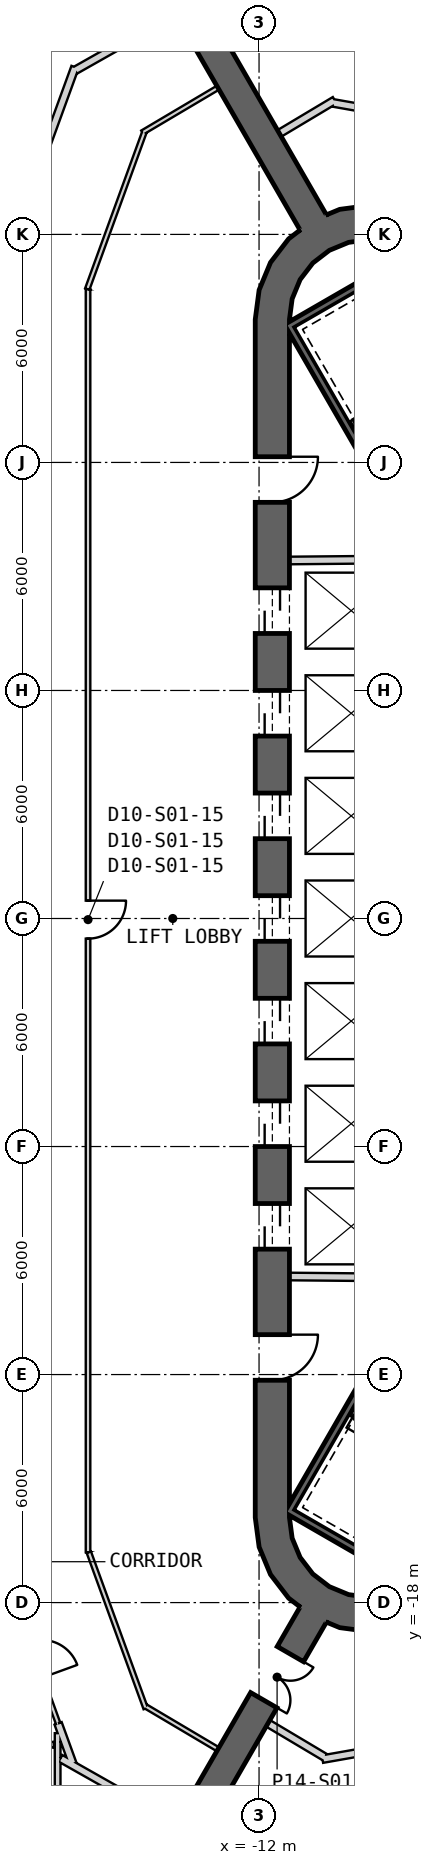
"""IFC4 building model, lengths in metres.
Left out: names, types, materials, properties, quantities, classifications, styles, units other than length and angle.
Written with IfcOpenShell. Run it as: python <this file> out.ifc"""

import sys

from ifc_helpers import new_model, si_unit, direction, frame, frame_2d, origin, place, context, subcontext, project, spatial, polyline, rectangle, outline, extrude, element, fill, save


model = new_model("IFC4")
c1 = context("Model", 3, precision=1e-05, world=origin(), true_north=direction((0.0, 1.0)))
c2 = subcontext(c1, "Body", "Model", "MODEL_VIEW")
j1 = project(units=[si_unit("LENGTHUNIT", "METRE"), si_unit("PLANEANGLEUNIT", "RADIAN")], contexts=[c1])
p1 = place(None, origin())
s1 = spatial("IfcSite", under=j1, at=p1, CompositionType="ELEMENT")
p2 = place(p1, origin())
s2 = spatial("IfcBuilding", under=s1, at=p2, CompositionType="ELEMENT")
p3 = place(p2, frame((0.0, 0.0, 57.8)))
s3 = spatial("IfcBuildingStorey", under=s2, at=p3, CompositionType="ELEMENT", Elevation=57.8)
p4 = place(p3, frame((-11.65, 15.762, 0.0), z_axis=(0.0, 0.0, 1.0), x_axis=(0.0, -1.0, 0.0)))
e1 = element("IfcWall", 1, at=p4, inside=s3, PredefinedType="SHEAR", context=c2, shape_type="SweptSolid", body=[
    extrude(rectangle(XDim=31.523, YDim=0.9, at=frame_2d((15.762, 0.0))), origin(), (0.0, 0.0, 1.0), 4.1),
])
p5 = place(p4, frame((7.062, 0.0, 0.0)))
e2 = element("IfcOpeningElement", 2, at=p5, cuts=e1, PredefinedType="OPENING", context=c2, shape_type="SweptSolid", body=[
    extrude(rectangle(XDim=1.2, YDim=2.4, at=frame_2d((0.6, 1.2))), frame((0.0, 0.46, 0.0), z_axis=(0.0, -1.0, 0.0), x_axis=(1.0, 0.0, 0.0)), (0.0, 0.0, 1.0), 0.92),
])
p6 = place(p4, frame((9.762, 0.0, 0.0)))
e3 = element("IfcOpeningElement", 3, at=p6, cuts=e1, PredefinedType="OPENING", context=c2, shape_type="SweptSolid", body=[
    extrude(rectangle(XDim=1.2, YDim=2.4, at=frame_2d((0.6, 1.2))), frame((0.0, 0.46, 0.0), z_axis=(0.0, -1.0, 0.0), x_axis=(1.0, 0.0, 0.0)), (0.0, 0.0, 1.0), 0.92),
])
p7 = place(p4, frame((12.462, 0.0, 0.0)))
e4 = element("IfcOpeningElement", 4, at=p7, cuts=e1, PredefinedType="OPENING", context=c2, shape_type="SweptSolid", body=[
    extrude(rectangle(XDim=1.2, YDim=2.4, at=frame_2d((0.6, 1.2))), frame((0.0, 0.46, 0.0), z_axis=(0.0, -1.0, 0.0), x_axis=(1.0, 0.0, 0.0)), (0.0, 0.0, 1.0), 0.92),
])
p8 = place(p4, frame((15.162, 0.0, 0.0)))
e5 = element("IfcOpeningElement", 5, at=p8, cuts=e1, PredefinedType="OPENING", context=c2, shape_type="SweptSolid", body=[
    extrude(rectangle(XDim=1.2, YDim=2.4, at=frame_2d((0.6, 1.2))), frame((0.0, 0.46, 0.0), z_axis=(0.0, -1.0, 0.0), x_axis=(1.0, 0.0, 0.0)), (0.0, 0.0, 1.0), 0.92),
])
p9 = place(p4, frame((17.862, 0.0, 0.0)))
e6 = element("IfcOpeningElement", 6, at=p9, cuts=e1, PredefinedType="OPENING", context=c2, shape_type="SweptSolid", body=[
    extrude(rectangle(XDim=1.2, YDim=2.4, at=frame_2d((0.6, 1.2))), frame((0.0, 0.46, 0.0), z_axis=(0.0, -1.0, 0.0), x_axis=(1.0, 0.0, 0.0)), (0.0, 0.0, 1.0), 0.92),
])
p10 = place(p4, frame((20.562, 0.0, 0.0)))
e7 = element("IfcOpeningElement", 7, at=p10, cuts=e1, PredefinedType="OPENING", context=c2, shape_type="SweptSolid", body=[
    extrude(rectangle(XDim=1.2, YDim=2.4, at=frame_2d((0.6, 1.2))), frame((0.0, 0.46, 0.0), z_axis=(0.0, -1.0, 0.0), x_axis=(1.0, 0.0, 0.0)), (0.0, 0.0, 1.0), 0.92),
])
p11 = place(p4, frame((23.262, 0.0, 0.0)))
e8 = element("IfcOpeningElement", 8, at=p11, cuts=e1, PredefinedType="OPENING", context=c2, shape_type="SweptSolid", body=[
    extrude(rectangle(XDim=1.2, YDim=2.4, at=frame_2d((0.6, 1.2))), frame((0.0, 0.46, 0.0), z_axis=(0.0, -1.0, 0.0), x_axis=(1.0, 0.0, 0.0)), (0.0, 0.0, 1.0), 0.92),
])
p12 = place(p4, frame((3.612, 0.0, 0.0)))
e9 = element("IfcOpeningElement", 9, at=p12, cuts=e1, PredefinedType="OPENING", context=c2, shape_type="SweptSolid", body=[
    extrude(rectangle(XDim=1.2, YDim=2.4, at=frame_2d((0.6, 1.2))), frame((0.0, 0.46, 0.0), z_axis=(0.0, -1.0, 0.0), x_axis=(1.0, 0.0, 0.0)), (0.0, 0.0, 1.0), 0.92),
])
p13 = place(p4, frame((26.712, 0.0, 0.0)))
e10 = element("IfcOpeningElement", 10, at=p13, cuts=e1, PredefinedType="OPENING", context=c2, shape_type="SweptSolid", body=[
    extrude(rectangle(XDim=1.2, YDim=2.4, at=frame_2d((0.6, 1.2))), frame((0.0, 0.46, 0.0), z_axis=(0.0, -1.0, 0.0), x_axis=(1.0, 0.0, 0.0)), (0.0, 0.0, 1.0), 0.92),
])
p14 = place(p3, origin())
e11 = element("IfcWall", 11, at=p14, inside=s3, PredefinedType="SHEAR", context=c2, shape_type="SweptSolid", body=[
    extrude(outline(polyline([(-7.6, 18.36), (-8.323, 18.659), (-9.1, 18.762), (-9.876, 18.659), (-10.6, 18.36), (-11.221, 17.883), (-11.698, 17.262), (-11.998, 16.538), (-12.1, 15.762), (-11.2, 15.762), (-11.128, 16.305), (-10.919, 16.812), (-10.585, 17.247), (-10.15, 17.58), (-9.644, 17.79), (-9.1, 17.862), (-8.556, 17.79), (-8.05, 17.58), (-7.6, 18.36)])), origin(), (0.0, 0.0, 1.0), 4.1),
])
p15 = place(p3, origin())
e12 = element("IfcWall", 12, at=p15, inside=s3, PredefinedType="SHEAR", context=c2, shape_type="SweptSolid", body=[
    extrude(outline(polyline([(-12.1, -15.762), (-11.998, -16.538), (-11.698, -17.262), (-11.221, -17.883), (-10.6, -18.36), (-9.876, -18.659), (-9.1, -18.762), (-8.323, -18.659), (-7.6, -18.36), (-8.05, -17.58), (-8.556, -17.79), (-9.1, -17.862), (-9.644, -17.79), (-10.15, -17.58), (-10.585, -17.247), (-10.919, -16.812), (-11.128, -16.305), (-11.2, -15.762), (-12.1, -15.762)])), origin(), (0.0, 0.0, 1.0), 4.1),
])
p16 = place(p3, frame((-10.575, 18.316, 0.0), z_axis=(0.0, 0.0, 1.0), x_axis=(-0.500001010139, 0.866024820579, 0.0)))
e13 = element("IfcWall", 13, at=p16, inside=s3, PredefinedType="SHEAR", context=c2, shape_type="SweptSolid", body=[
    extrude(rectangle(XDim=13.884, YDim=0.8, at=frame_2d((6.942, 0.0))), origin(), (0.0, 0.0, 1.0), 4.1),
])
p17 = place(p16, frame((7.05, 0.0, 0.0)))
e14 = element("IfcOpeningElement", 14, at=p17, cuts=e13, PredefinedType="OPENING", context=c2, shape_type="SweptSolid", body=[
    extrude(rectangle(XDim=1.4, YDim=2.4, at=frame_2d((0.7, 1.2))), frame((0.0, 0.41, 0.0), z_axis=(0.0, -1.0, 0.0), x_axis=(1.0, 0.0, 0.0)), (0.0, 0.0, 1.0), 0.82),
])
p18 = place(p3, frame((-10.575, -18.316, 0.0), z_axis=(0.0, 0.0, 1.0), x_axis=(-0.500001010139, -0.866024820579, 0.0)))
e15 = element("IfcWall", 15, at=p18, inside=s3, PredefinedType="SHEAR", context=c2, shape_type="SweptSolid", body=[
    extrude(rectangle(XDim=13.884, YDim=0.8, at=frame_2d((6.942, 0.0))), origin(), (0.0, 0.0, 1.0), 4.1),
])
p19 = place(p18, frame((1.2, 0.0, 0.0)))
e16 = element("IfcOpeningElement", 16, at=p19, cuts=e15, PredefinedType="OPENING", context=c2, shape_type="SweptSolid", body=[
    extrude(rectangle(XDim=1.4, YDim=2.4, at=frame_2d((0.7, 1.2))), frame((0.0, 0.41, 0.0), z_axis=(0.0, -1.0, 0.0), x_axis=(1.0, 0.0, 0.0)), (0.0, 0.0, 1.0), 0.82),
])
p20 = place(p3, frame((-11.2, 9.42, 0.0), z_axis=(0.0, 0.0, 1.0), x_axis=(0.999957167047, 0.009255488683, 0.0)))
e17 = element("IfcWall", 17, at=p20, inside=s3, PredefinedType="PLUMBINGWALL", context=c2, shape_type="SweptSolid", body=[
    extrude(rectangle(XDim=3.35, YDim=0.2, at=frame_2d((1.675, 0.0))), origin(), (0.0, 0.0, 1.0), 3.8),
])
p21 = place(p3, frame((-8.05, -9.449, 0.0), z_axis=(0.0, 0.0, 1.0), x_axis=(-0.999957467379, 0.009222983926, 0.0)))
e18 = element("IfcWall", 18, at=p21, inside=s3, PredefinedType="PLUMBINGWALL", context=c2, shape_type="SweptSolid", body=[
    extrude(rectangle(XDim=3.15, YDim=0.2, at=frame_2d((1.575, 0.0))), origin(), (0.0, 0.0, 1.0), 3.8),
])
p22 = place(p3, frame((-11.245, 15.678, -0.3), z_axis=(0.0, 0.0, 1.0), x_axis=(0.499977274689, -0.866038523851, 0.0)))
e19 = element("IfcWall", 19, at=p22, inside=s3, PredefinedType="SHEAR", context=c2, shape_type="SweptSolid", body=[
    extrude(rectangle(XDim=8.1, YDim=0.2, at=frame_2d((4.05, 0.0))), origin(), (0.0, 0.0, 1.0), 4.1),
])
for number, where, z_axis, x_axis in (
    (20, (-7.818, 17.541, -0.3), (0.0, 0.0, 1.0), (-0.866, -0.5, 0.0)),
    (21, (-11.282, -15.541, -0.3), (0.0, 0.0, 1.0), (0.866, -0.5, 0.0)),
):
    element("IfcWall", number, at=place(p3, frame(where, z_axis=z_axis, x_axis=x_axis)), inside=s3, PredefinedType="SHEAR", context=c2, shape_type="SweptSolid", body=[
        extrude(rectangle(XDim=3.8, YDim=0.2, at=frame_2d((1.9, 0.0))), origin(), (0.0, 0.0, 1.0), 4.1),
    ])
p23 = place(p3, frame((-7.196, -8.663, -0.3), z_axis=(0.0, 0.0, 1.0), x_axis=(-0.499997992926, -0.866026562566, 0.0)))
e22 = element("IfcWall", 22, at=p23, inside=s3, PredefinedType="SHEAR", context=c2, shape_type="SweptSolid", body=[
    extrude(rectangle(XDim=7.9, YDim=0.2, at=frame_2d((3.95, 0.0))), origin(), (0.0, 0.0, 1.0), 4.1),
])
p24 = place(p3, frame((-13.082, 21.859, 0.0), z_axis=(0.0, 0.0, 1.0), x_axis=(-0.860286384661, -0.509811079095, 0.0)))
e23 = element("IfcWall", 23, at=p24, inside=s3, PredefinedType="PARTITIONING", context=c2, shape_type="SweptSolid", body=[
    extrude(rectangle(XDim=2.311, YDim=0.12, at=frame_2d((1.155, 0.0))), origin(), (0.0, 0.0, 1.0), 3.8),
])
p25 = place(p3, frame((-15.017, 20.692, 0.0), z_axis=(0.0, 0.0, 1.0), x_axis=(-0.342028368186, -0.939689627141, 0.0)))
e24 = element("IfcWall", 24, at=p25, inside=s3, PredefinedType="PARTITIONING", context=c2, shape_type="SweptSolid", body=[
    extrude(rectangle(XDim=4.397, YDim=0.12, at=frame_2d((2.198, 0.0))), origin(), (0.0, 0.0, 1.0), 2.88),
])
p26 = place(p3, frame((-16.5, 16.557, 0.0), z_axis=(0.0, 0.0, 1.0), x_axis=(0.0, -1.0, 0.0)))
e25 = element("IfcWall", 25, at=p26, inside=s3, PredefinedType="PARTITIONING", context=c2, shape_type="SweptSolid", body=[
    extrude(rectangle(XDim=33.234, YDim=0.12, at=frame_2d((16.617, 0.0))), origin(), (0.0, 0.0, 1.0), 2.98),
])
p27 = place(p26, frame((16.087, 0.0, 0.0)))
e26 = element("IfcOpeningElement", 26, at=p27, cuts=e25, PredefinedType="OPENING", context=c2, shape_type="SweptSolid", body=[
    extrude(rectangle(XDim=1.0, YDim=2.1, at=frame_2d((0.5, 1.05))), frame((0.0, 0.07, 0.0), z_axis=(0.0, -1.0, 0.0), x_axis=(1.0, 0.0, 0.0)), (0.0, 0.0, 1.0), 0.14),
])
p28 = place(p3, frame((-16.479, -16.673, 0.0), z_axis=(0.0, 0.0, 1.0), x_axis=(0.342025144217, -0.939690800595, 0.0)))
e27 = element("IfcWall", 27, at=p28, inside=s3, PredefinedType="PARTITIONING", context=c2, shape_type="SweptSolid", body=[
    extrude(rectangle(XDim=4.378, YDim=0.12, at=frame_2d((2.189, 0.0))), origin(), (0.0, 0.0, 1.0), 2.88),
])
p29 = place(p3, frame((-14.983, -20.732, 0.0), z_axis=(0.0, 0.0, 1.0), x_axis=(0.860268204019, -0.509841756973, 0.0)))
e28 = element("IfcWall", 28, at=p29, inside=s3, PredefinedType="PARTITIONING", context=c2, shape_type="SweptSolid", body=[
    extrude(rectangle(XDim=2.21, YDim=0.12, at=frame_2d((1.105, 0.0))), origin(), (0.0, 0.0, 1.0), 3.8),
])
p30 = place(p3, frame((-17.225, -22.098, 0.0), z_axis=(0.0, 0.0, 1.0), x_axis=(0.870318902943, -0.492488585838, 0.0)))
e29 = element("IfcWall", 29, at=p30, inside=s3, PredefinedType="PARTITIONING", context=c2, shape_type="SweptSolid", body=[
    extrude(rectangle(XDim=3.469, YDim=0.2, at=frame_2d((1.734, 0.0))), origin(), (0.0, 0.0, 1.0), 2.88),
])
p31 = place(p3, frame((-17.288, -21.178, 0.0), z_axis=(0.0, 0.0, 1.0), x_axis=(0.342070628624, -0.939674244104, 0.0)))
e30 = element("IfcWall", 30, at=p31, inside=s3, PredefinedType="PARTITIONING", context=c2, shape_type="SweptSolid", body=[
    extrude(rectangle(XDim=1.137, YDim=0.2, at=frame_2d((0.568, 0.0))), origin(), (0.0, 0.0, 1.0), 2.88),
])
p32 = place(p3, frame((-16.842, 22.402, 0.0), z_axis=(0.0, 0.0, 1.0), x_axis=(-0.342049747763, -0.939681845124, 0.0)))
e31 = element("IfcWall", 31, at=p32, inside=s3, PredefinedType="PARTITIONING", context=c2, shape_type="SweptSolid", body=[
    extrude(rectangle(XDim=5.625, YDim=0.2, at=frame_2d((2.812, 0.0))), origin(), (0.0, 0.0, 1.0), 2.88),
])
p33 = place(p3, frame((-14.206, 23.806, 0.0), z_axis=(0.0, 0.0, 1.0), x_axis=(-0.87028621909, -0.492546339811, 0.0)))
e32 = element("IfcWall", 32, at=p33, inside=s3, PredefinedType="PARTITIONING", context=c2, shape_type="SweptSolid", body=[
    extrude(rectangle(XDim=3.026, YDim=0.2, at=frame_2d((1.513, 0.0))), origin(), (0.0, 0.0, 1.0), 3.8),
])
p34 = place(p3, frame((-18.5, -17.846, 0.0), z_axis=(0.0, 0.0, 1.0), x_axis=(0.342013954414, -0.939694873342, 0.0)))
e33 = element("IfcWall", 33, at=p34, inside=s3, PredefinedType="PARTITIONING", context=c2, shape_type="SweptSolid", body=[
    extrude(rectangle(XDim=3.546, YDim=0.12, at=frame_2d((1.773, 0.0))), origin(), (0.0, 0.0, 1.0), 3.8),
])
p35 = place(p34, frame((1.273, 0.0, 0.0)))
e34 = element("IfcOpeningElement", 34, at=p35, cuts=e33, PredefinedType="OPENING", context=c2, shape_type="SweptSolid", body=[
    extrude(rectangle(XDim=1.0, YDim=2.1, at=frame_2d((0.5, 1.05))), frame((0.0, 0.07, 0.0), z_axis=(0.0, -1.0, 0.0), x_axis=(1.0, 0.0, 0.0)), (0.0, 0.0, 1.0), 0.14),
])
p36 = place(p3, frame((-10.007, 21.529, 0.0), z_axis=(0.0, 0.0, 1.0), x_axis=(-0.858379714818, -0.513014878136, 0.0)))
e35 = element("IfcWall", 35, at=p36, inside=s3, PredefinedType="PARTITIONING", context=c2, shape_type="SweptSolid", body=[
    extrude(rectangle(XDim=1.698, YDim=0.2, at=frame_2d((0.849, 0.0))), origin(), (0.0, 0.0, 1.0), 3.8),
])
p37 = place(p3, frame((-6.667, 20.863, 0.0), z_axis=(0.0, 0.0, 1.0), x_axis=(-0.984817805596, 0.173591156977, 0.0)))
e36 = element("IfcWall", 36, at=p37, inside=s3, PredefinedType="PARTITIONING", context=c2, shape_type="SweptSolid", body=[
    extrude(rectangle(XDim=3.443, YDim=0.2, at=frame_2d((1.721, 0.0))), origin(), (0.0, 0.0, 1.0), 2.88),
])
p38 = place(p3, frame((-10.332, -22.118, 0.0), z_axis=(0.0, 0.0, 1.0), x_axis=(0.984805281118, 0.173662195893, 0.0)))
e37 = element("IfcWall", 37, at=p38, inside=s3, PredefinedType="PARTITIONING", context=c2, shape_type="SweptSolid", body=[
    extrude(rectangle(XDim=3.732, YDim=0.2, at=frame_2d((1.866, 0.0))), origin(), (0.0, 0.0, 1.0), 2.88),
])
p39 = place(p3, frame((-11.764, -21.177, 0.0), z_axis=(0.0, 0.0, 1.0), x_axis=(0.85911197479, -0.511787665709, 0.0)))
e38 = element("IfcWall", 38, at=p39, inside=s3, PredefinedType="PARTITIONING", context=c2, shape_type="SweptSolid", body=[
    extrude(rectangle(XDim=1.752, YDim=0.2, at=frame_2d((0.876, 0.0))), origin(), (0.0, 0.0, 1.0), 3.8),
])
p40 = place(p3, frame((-17.3, -27.155, 0.0), z_axis=(0.0, 0.0, 1.0), x_axis=(0.0, 1.0, 0.0)))
e39 = element("IfcWall", 39, at=p40, inside=s3, PredefinedType="PLUMBINGWALL", context=c2, shape_type="SweptSolid", body=[
    extrude(rectangle(XDim=5.719, YDim=0.15, at=frame_2d((2.859, 0.0))), origin(), (0.0, 0.0, 1.0), 2.88),
])
p41 = place(p3, frame((-17.4, -21.741, 0.0), z_axis=(0.0, 0.0, 1.0), x_axis=(-1.0, 0.0, 0.0)))
e40 = element("IfcWall", 40, at=p41, inside=s3, PredefinedType="PLUMBINGWALL", context=c2, shape_type="SweptSolid", body=[
    extrude(rectangle(XDim=6.58, YDim=0.15, at=frame_2d((3.29, 0.0))), origin(), (0.0, 0.0, 1.0), 2.98),
])
p42 = place(p27, origin())
e41 = element("IfcDoor", 41, at=p42, inside=s3, OperationType="SINGLE_SWING_LEFT", PredefinedType="NOTDEFINED", context=c2, shape_type="SweptSolid", body=[
    extrude(rectangle(XDim=1.0, YDim=2.1, at=frame_2d((0.5, 1.05))), frame((0.0, 0.025, 0.0), z_axis=(0.0, -1.0, 0.0), x_axis=(1.0, 0.0, 0.0)), (0.0, 0.0, 1.0), 0.05),
])
fill(e26, e41)
p43 = place(p5, origin())
e42 = element("IfcDoor", 42, at=p43, inside=s3, OperationType="SLIDING_TO_LEFT", PredefinedType="USERDEFINED", context=c2, shape_type="SweptSolid", body=[
    extrude(rectangle(XDim=1.2, YDim=2.4, at=frame_2d((0.6, 1.2))), frame((0.0, 0.025, 0.0), z_axis=(0.0, -1.0, 0.0), x_axis=(1.0, 0.0, 0.0)), (0.0, 0.0, 1.0), 0.05),
])
fill(e2, e42)
p44 = place(p6, origin())
e43 = element("IfcDoor", 43, at=p44, inside=s3, OperationType="SLIDING_TO_LEFT", PredefinedType="USERDEFINED", context=c2, shape_type="SweptSolid", body=[
    extrude(rectangle(XDim=1.2, YDim=2.4, at=frame_2d((0.6, 1.2))), frame((0.0, 0.025, 0.0), z_axis=(0.0, -1.0, 0.0), x_axis=(1.0, 0.0, 0.0)), (0.0, 0.0, 1.0), 0.05),
])
fill(e3, e43)
p45 = place(p7, origin())
e44 = element("IfcDoor", 44, at=p45, inside=s3, OperationType="SLIDING_TO_LEFT", PredefinedType="USERDEFINED", context=c2, shape_type="SweptSolid", body=[
    extrude(rectangle(XDim=1.2, YDim=2.4, at=frame_2d((0.6, 1.2))), frame((0.0, 0.025, 0.0), z_axis=(0.0, -1.0, 0.0), x_axis=(1.0, 0.0, 0.0)), (0.0, 0.0, 1.0), 0.05),
])
fill(e4, e44)
p46 = place(p8, origin())
e45 = element("IfcDoor", 45, at=p46, inside=s3, OperationType="SLIDING_TO_LEFT", PredefinedType="USERDEFINED", context=c2, shape_type="SweptSolid", body=[
    extrude(rectangle(XDim=1.2, YDim=2.4, at=frame_2d((0.6, 1.2))), frame((0.0, 0.025, 0.0), z_axis=(0.0, -1.0, 0.0), x_axis=(1.0, 0.0, 0.0)), (0.0, 0.0, 1.0), 0.05),
])
fill(e5, e45)
p47 = place(p9, origin())
e46 = element("IfcDoor", 46, at=p47, inside=s3, OperationType="SLIDING_TO_LEFT", PredefinedType="USERDEFINED", context=c2, shape_type="SweptSolid", body=[
    extrude(rectangle(XDim=1.2, YDim=2.4, at=frame_2d((0.6, 1.2))), frame((0.0, 0.025, 0.0), z_axis=(0.0, -1.0, 0.0), x_axis=(1.0, 0.0, 0.0)), (0.0, 0.0, 1.0), 0.05),
])
fill(e6, e46)
p48 = place(p10, origin())
e47 = element("IfcDoor", 47, at=p48, inside=s3, OperationType="SLIDING_TO_LEFT", PredefinedType="USERDEFINED", context=c2, shape_type="SweptSolid", body=[
    extrude(rectangle(XDim=1.2, YDim=2.4, at=frame_2d((0.6, 1.2))), frame((0.0, 0.025, 0.0), z_axis=(0.0, -1.0, 0.0), x_axis=(1.0, 0.0, 0.0)), (0.0, 0.0, 1.0), 0.05),
])
fill(e7, e47)
p49 = place(p11, origin())
e48 = element("IfcDoor", 48, at=p49, inside=s3, OperationType="SLIDING_TO_LEFT", PredefinedType="USERDEFINED", context=c2, shape_type="SweptSolid", body=[
    extrude(rectangle(XDim=1.2, YDim=2.4, at=frame_2d((0.6, 1.2))), frame((0.0, 0.025, 0.0), z_axis=(0.0, -1.0, 0.0), x_axis=(1.0, 0.0, 0.0)), (0.0, 0.0, 1.0), 0.05),
])
fill(e8, e48)
p50 = place(p12, origin())
e49 = element("IfcDoor", 49, at=p50, inside=s3, OperationType="SINGLE_SWING_LEFT", PredefinedType="USERDEFINED", context=c2, shape_type="SweptSolid", body=[
    extrude(rectangle(XDim=1.2, YDim=2.4, at=frame_2d((0.6, 1.2))), frame((0.0, 0.025, 0.0), z_axis=(0.0, -1.0, 0.0), x_axis=(1.0, 0.0, 0.0)), (0.0, 0.0, 1.0), 0.05),
])
fill(e9, e49)
p51 = place(p13, origin())
e50 = element("IfcDoor", 50, at=p51, inside=s3, OperationType="SINGLE_SWING_LEFT", PredefinedType="USERDEFINED", context=c2, shape_type="SweptSolid", body=[
    extrude(rectangle(XDim=1.2, YDim=2.4, at=frame_2d((0.6, 1.2))), frame((0.0, 0.025, 0.0), z_axis=(0.0, -1.0, 0.0), x_axis=(1.0, 0.0, 0.0)), (0.0, 0.0, 1.0), 0.05),
])
fill(e10, e50)
p52 = place(p19, origin())
e51 = element("IfcDoor", 51, at=p52, inside=s3, OperationType="DOUBLE_DOOR_SINGLE_SWING", PredefinedType="NOTDEFINED", context=c2, shape_type="SweptSolid", body=[
    extrude(rectangle(XDim=1.4, YDim=2.4, at=frame_2d((0.7, 1.2))), frame((0.0, 0.025, 0.0), z_axis=(0.0, -1.0, 0.0), x_axis=(1.0, 0.0, 0.0)), (0.0, 0.0, 1.0), 0.05),
])
fill(e16, e51)
save(model, sys.argv[1])
